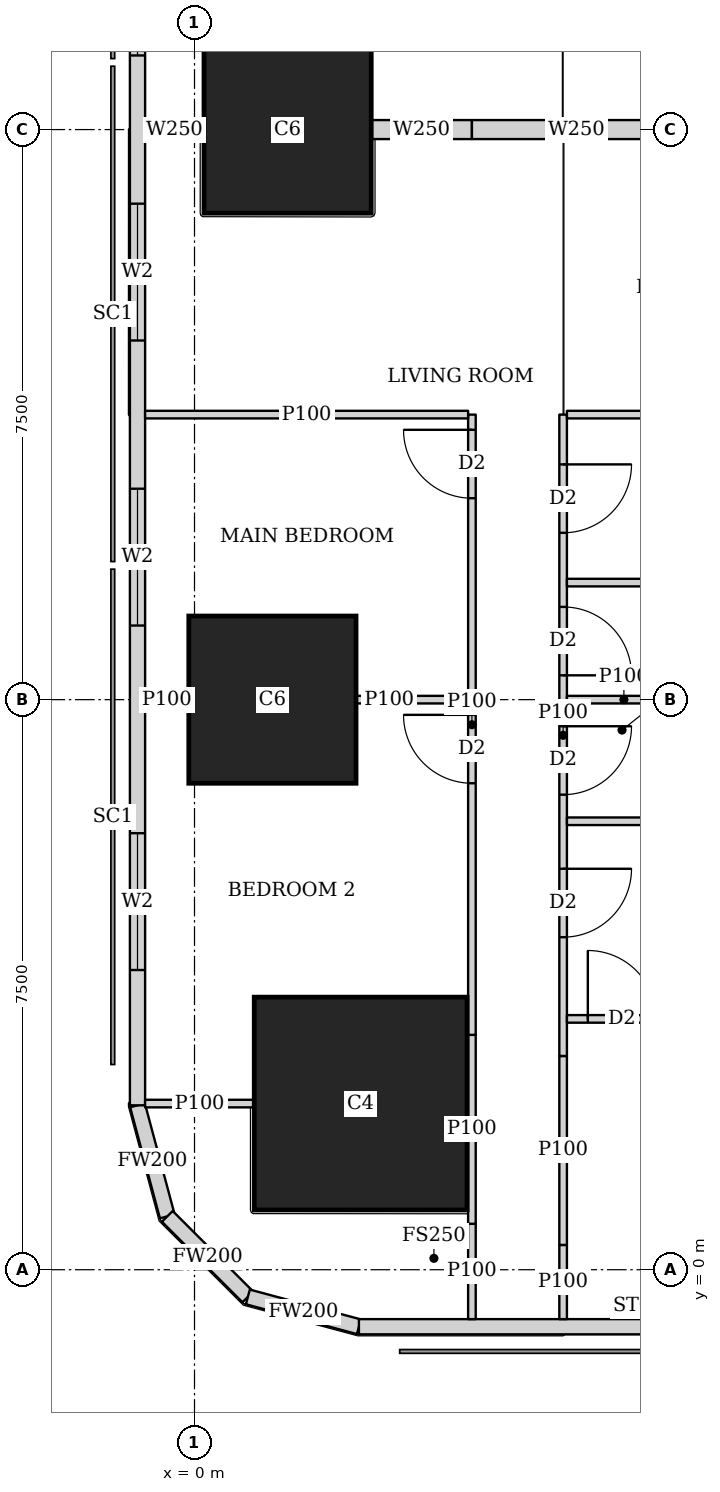
"""IFC4 building model, lengths in metres.
Left out: names, types, materials, properties, quantities, classifications, styles, units other than length and angle.
Written with IfcOpenShell. Run it as: python <this file> out.ifc"""

import sys

from ifc_helpers import new_model, si_unit, direction, frame, frame_2d, origin, origin_2d, place, context, subcontext, project, spatial, rectangle, extrude, element, fill, save


model = new_model("IFC4")
c1 = context("Model", 3, precision=1e-05, world=origin(), true_north=direction((0.0, 1.0)))
c2 = subcontext(c1, "Body", "Model", "MODEL_VIEW")
j1 = project(units=[si_unit("LENGTHUNIT", "METRE"), si_unit("PLANEANGLEUNIT", "RADIAN")], contexts=[c1])
p1 = place(None, origin())
s1 = spatial("IfcSite", under=j1, at=p1, CompositionType="ELEMENT")
p2 = place(p1, origin())
s2 = spatial("IfcBuilding", under=s1, at=p2, CompositionType="ELEMENT")
p3 = place(p2, frame((0.0, 0.0, 100.4)))
s3 = spatial("IfcBuildingStorey", under=s2, at=p3, CompositionType="ELEMENT", Elevation=100.4)
p4 = place(p3, frame((2.186, 2.186, 0.0), z_axis=(0.0, 0.0, 1.0), x_axis=(1.0, 0.0, 0.0)))
e1 = element("IfcColumn", 1, at=p4, inside=s3, PredefinedType="COLUMN", context=c2, shape_type="SweptSolid", body=[
    extrude(rectangle(XDim=2.8, YDim=2.8, at=origin_2d()), origin(), (0.0, 0.0, 1.0), 3.75),
])
for number, where, z_axis, x_axis in (
    (2, (1.025, 7.5, 0.0), (0.0, 0.0, 1.0), (1.0, 0.0, 0.0)),
    (3, (1.225, 15.0, 0.0), (0.0, 0.0, 1.0), (1.0, 0.0, 0.0)),
):
    element("IfcColumn", number, at=place(p3, frame(where, z_axis=z_axis, x_axis=x_axis)), inside=s3, PredefinedType="COLUMN", context=c2, shape_type="SweptSolid", body=[
        extrude(rectangle(XDim=2.2, YDim=2.2, at=origin_2d()), origin(), (0.0, 0.0, 1.0), 3.75),
    ])
p5 = place(p3, frame((2.163, -0.75, 0.0), z_axis=(0.0, 0.0, 1.0), x_axis=(1.0, 0.0, 0.0)))
e4 = element("IfcWall", 4, at=p5, inside=s3, PredefinedType="SOLIDWALL", context=c2, shape_type="SweptSolid", body=[
    extrude(rectangle(XDim=45.628, YDim=0.2, at=frame_2d((22.814, 0.0))), origin(), (0.0, 0.0, 1.0), 3.5),
])
p6 = place(p5, frame((9.537, 0.0, 0.9)))
e5 = element("IfcOpeningElement", 5, at=p6, cuts=e4, PredefinedType="OPENING", context=c2, shape_type="SweptSolid", body=[
    extrude(rectangle(XDim=1.8, YDim=1.5, at=frame_2d((0.9, 0.75))), frame((0.0, 0.11, 0.0), z_axis=(0.0, -1.0, 0.0), x_axis=(1.0, 0.0, 0.0)), (0.0, 0.0, 1.0), 0.22),
])
p7 = place(p5, frame((13.137, 0.0, 0.9)))
e6 = element("IfcOpeningElement", 6, at=p7, cuts=e4, PredefinedType="OPENING", context=c2, shape_type="SweptSolid", body=[
    extrude(rectangle(XDim=1.8, YDim=1.5, at=frame_2d((0.9, 0.75))), frame((0.0, 0.11, 0.0), z_axis=(0.0, -1.0, 0.0), x_axis=(1.0, 0.0, 0.0)), (0.0, 0.0, 1.0), 0.22),
])
p8 = place(p5, frame((16.737, 0.0, 0.9)))
e7 = element("IfcOpeningElement", 7, at=p8, cuts=e4, PredefinedType="OPENING", context=c2, shape_type="SweptSolid", body=[
    extrude(rectangle(XDim=1.8, YDim=1.5, at=frame_2d((0.9, 0.75))), frame((0.0, 0.11, 0.0), z_axis=(0.0, -1.0, 0.0), x_axis=(1.0, 0.0, 0.0)), (0.0, 0.0, 1.0), 0.22),
])
p9 = place(p5, frame((20.337, 0.0, 0.9)))
e8 = element("IfcOpeningElement", 8, at=p9, cuts=e4, PredefinedType="OPENING", context=c2, shape_type="SweptSolid", body=[
    extrude(rectangle(XDim=1.8, YDim=1.5, at=frame_2d((0.9, 0.75))), frame((0.0, 0.11, 0.0), z_axis=(0.0, -1.0, 0.0), x_axis=(1.0, 0.0, 0.0)), (0.0, 0.0, 1.0), 0.22),
])
p10 = place(p5, frame((23.937, 0.0, 0.9)))
e9 = element("IfcOpeningElement", 9, at=p10, cuts=e4, PredefinedType="OPENING", context=c2, shape_type="SweptSolid", body=[
    extrude(rectangle(XDim=1.8, YDim=1.5, at=frame_2d((0.9, 0.75))), frame((0.0, 0.11, 0.0), z_axis=(0.0, -1.0, 0.0), x_axis=(1.0, 0.0, 0.0)), (0.0, 0.0, 1.0), 0.22),
])
p11 = place(p5, frame((27.537, 0.0, 0.9)))
e10 = element("IfcOpeningElement", 10, at=p11, cuts=e4, PredefinedType="OPENING", context=c2, shape_type="SweptSolid", body=[
    extrude(rectangle(XDim=1.8, YDim=1.5, at=frame_2d((0.9, 0.75))), frame((0.0, 0.11, 0.0), z_axis=(0.0, -1.0, 0.0), x_axis=(1.0, 0.0, 0.0)), (0.0, 0.0, 1.0), 0.22),
])
p12 = place(p5, frame((31.137, 0.0, 0.9)))
e11 = element("IfcOpeningElement", 11, at=p12, cuts=e4, PredefinedType="OPENING", context=c2, shape_type="SweptSolid", body=[
    extrude(rectangle(XDim=1.8, YDim=1.5, at=frame_2d((0.9, 0.75))), frame((0.0, 0.11, 0.0), z_axis=(0.0, -1.0, 0.0), x_axis=(1.0, 0.0, 0.0)), (0.0, 0.0, 1.0), 0.22),
])
p13 = place(p5, frame((34.737, 0.0, 0.9)))
e12 = element("IfcOpeningElement", 12, at=p13, cuts=e4, PredefinedType="OPENING", context=c2, shape_type="SweptSolid", body=[
    extrude(rectangle(XDim=1.8, YDim=1.5, at=frame_2d((0.9, 0.75))), frame((0.0, 0.11, 0.0), z_axis=(0.0, -1.0, 0.0), x_axis=(1.0, 0.0, 0.0)), (0.0, 0.0, 1.0), 0.22),
])
p14 = place(p3, frame((-0.75, 42.837, 0.0), z_axis=(0.0, 0.0, 1.0), x_axis=(0.0, -1.0, 0.0)))
e13 = element("IfcWall", 13, at=p14, inside=s3, PredefinedType="SOLIDWALL", context=c2, shape_type="SweptSolid", body=[
    extrude(rectangle(XDim=40.674, YDim=0.2, at=frame_2d((20.337, 0.0))), origin(), (0.0, 0.0, 1.0), 3.5),
])
p15 = place(p14, frame((1.78, 0.0, 0.9)))
e14 = element("IfcOpeningElement", 14, at=p15, cuts=e13, PredefinedType="OPENING", context=c2, shape_type="SweptSolid", body=[
    extrude(rectangle(XDim=1.8, YDim=1.5, at=frame_2d((0.9, 0.75))), frame((0.0, 0.11, 0.0), z_axis=(0.0, -1.0, 0.0), x_axis=(1.0, 0.0, 0.0)), (0.0, 0.0, 1.0), 0.22),
])
p16 = place(p14, frame((6.312, 0.0, 0.9)))
e15 = element("IfcOpeningElement", 15, at=p16, cuts=e13, PredefinedType="OPENING", context=c2, shape_type="SweptSolid", body=[
    extrude(rectangle(XDim=1.8, YDim=1.5, at=frame_2d((0.9, 0.75))), frame((0.0, 0.11, 0.0), z_axis=(0.0, -1.0, 0.0), x_axis=(1.0, 0.0, 0.0)), (0.0, 0.0, 1.0), 0.22),
])
p17 = place(p14, frame((10.062, 0.0, 0.9)))
e16 = element("IfcOpeningElement", 16, at=p17, cuts=e13, PredefinedType="OPENING", context=c2, shape_type="SweptSolid", body=[
    extrude(rectangle(XDim=1.8, YDim=1.5, at=frame_2d((0.9, 0.75))), frame((0.0, 0.11, 0.0), z_axis=(0.0, -1.0, 0.0), x_axis=(1.0, 0.0, 0.0)), (0.0, 0.0, 1.0), 0.22),
])
p18 = place(p14, frame((13.812, 0.0, 0.9)))
e17 = element("IfcOpeningElement", 17, at=p18, cuts=e13, PredefinedType="OPENING", context=c2, shape_type="SweptSolid", body=[
    extrude(rectangle(XDim=1.8, YDim=1.5, at=frame_2d((0.9, 0.75))), frame((0.0, 0.11, 0.0), z_axis=(0.0, -1.0, 0.0), x_axis=(1.0, 0.0, 0.0)), (0.0, 0.0, 1.0), 0.22),
])
p19 = place(p14, frame((17.562, 0.0, 0.9)))
e18 = element("IfcOpeningElement", 18, at=p19, cuts=e13, PredefinedType="OPENING", context=c2, shape_type="SweptSolid", body=[
    extrude(rectangle(XDim=1.8, YDim=1.5, at=frame_2d((0.9, 0.75))), frame((0.0, 0.11, 0.0), z_axis=(0.0, -1.0, 0.0), x_axis=(1.0, 0.0, 0.0)), (0.0, 0.0, 1.0), 0.22),
])
p20 = place(p14, frame((21.312, 0.0, 0.9)))
e19 = element("IfcOpeningElement", 19, at=p20, cuts=e13, PredefinedType="OPENING", context=c2, shape_type="SweptSolid", body=[
    extrude(rectangle(XDim=1.8, YDim=1.5, at=frame_2d((0.9, 0.75))), frame((0.0, 0.11, 0.0), z_axis=(0.0, -1.0, 0.0), x_axis=(1.0, 0.0, 0.0)), (0.0, 0.0, 1.0), 0.22),
])
p21 = place(p14, frame((25.062, 0.0, 0.9)))
e20 = element("IfcOpeningElement", 20, at=p21, cuts=e13, PredefinedType="OPENING", context=c2, shape_type="SweptSolid", body=[
    extrude(rectangle(XDim=1.8, YDim=1.5, at=frame_2d((0.9, 0.75))), frame((0.0, 0.11, 0.0), z_axis=(0.0, -1.0, 0.0), x_axis=(1.0, 0.0, 0.0)), (0.0, 0.0, 1.0), 0.22),
])
p22 = place(p14, frame((28.812, 0.0, 0.9)))
e21 = element("IfcOpeningElement", 21, at=p22, cuts=e13, PredefinedType="OPENING", context=c2, shape_type="SweptSolid", body=[
    extrude(rectangle(XDim=1.8, YDim=1.5, at=frame_2d((0.9, 0.75))), frame((0.0, 0.11, 0.0), z_axis=(0.0, -1.0, 0.0), x_axis=(1.0, 0.0, 0.0)), (0.0, 0.0, 1.0), 0.22),
])
p23 = place(p14, frame((32.562, 0.0, 0.9)))
e22 = element("IfcOpeningElement", 22, at=p23, cuts=e13, PredefinedType="OPENING", context=c2, shape_type="SweptSolid", body=[
    extrude(rectangle(XDim=1.8, YDim=1.5, at=frame_2d((0.9, 0.75))), frame((0.0, 0.11, 0.0), z_axis=(0.0, -1.0, 0.0), x_axis=(1.0, 0.0, 0.0)), (0.0, 0.0, 1.0), 0.22),
])
p24 = place(p14, frame((37.094, 0.0, 0.9)))
e23 = element("IfcOpeningElement", 23, at=p24, cuts=e13, PredefinedType="OPENING", context=c2, shape_type="SweptSolid", body=[
    extrude(rectangle(XDim=1.8, YDim=1.5, at=frame_2d((0.9, 0.75))), frame((0.0, 0.11, 0.0), z_axis=(0.0, -1.0, 0.0), x_axis=(1.0, 0.0, 0.0)), (0.0, 0.0, 1.0), 0.22),
])
p25 = place(p3, frame((-0.75, 2.163, 0.0), z_axis=(0.0, 0.0, 1.0), x_axis=(0.259168954497, -0.965832000415, 0.0)))
e24 = element("IfcWall", 24, at=p25, inside=s3, PredefinedType="SOLIDWALL", context=c2, shape_type="SweptSolid", body=[
    extrude(rectangle(XDim=1.513, YDim=0.2, at=frame_2d((0.756, 0.0))), origin(), (0.0, 0.0, 1.0), 3.5),
])
p26 = place(p3, frame((-0.358, 0.702, 0.0), z_axis=(0.0, 0.0, 1.0), x_axis=(0.707106781187, -0.707106781187, 0.0)))
e25 = element("IfcWall", 25, at=p26, inside=s3, PredefinedType="SOLIDWALL", context=c2, shape_type="SweptSolid", body=[
    extrude(rectangle(XDim=1.499, YDim=0.2, at=frame_2d((0.75, 0.0))), origin(), (0.0, 0.0, 1.0), 3.5),
])
p27 = place(p3, frame((0.702, -0.358, 0.0), z_axis=(0.0, 0.0, 1.0), x_axis=(0.965832000415, -0.259168954497, 0.0)))
e26 = element("IfcWall", 26, at=p27, inside=s3, PredefinedType="SOLIDWALL", context=c2, shape_type="SweptSolid", body=[
    extrude(rectangle(XDim=1.513, YDim=0.2, at=frame_2d((0.756, 0.0))), origin(), (0.0, 0.0, 1.0), 3.5),
])
p28 = place(p3, frame((3.65, -0.65, 0.0), z_axis=(0.0, 0.0, 1.0), x_axis=(0.0, 1.0, 0.0)))
e27 = element("IfcWall", 27, at=p28, inside=s3, PredefinedType="PARTITIONING", context=c2, shape_type="SweptSolid", body=[
    extrude(rectangle(XDim=1.254, YDim=0.1, at=frame_2d((0.627, 0.0))), origin(), (0.0, 0.0, 1.0), 3.5),
])
p29 = place(p3, frame((3.65, 0.604, 0.0), z_axis=(0.0, 0.0, 1.0), x_axis=(0.0, 1.0, 0.0)))
e28 = element("IfcWall", 28, at=p29, inside=s3, PredefinedType="PARTITIONING", context=c2, shape_type="SweptSolid", body=[
    extrude(rectangle(XDim=2.486, YDim=0.1, at=frame_2d((1.243, 0.0))), origin(), (0.0, 0.0, 1.0), 2.05),
])
p30 = place(p3, frame((3.65, 3.09, 0.0), z_axis=(0.0, 0.0, 1.0), x_axis=(0.0, 1.0, 0.0)))
e29 = element("IfcWall", 29, at=p30, inside=s3, PredefinedType="PARTITIONING", context=c2, shape_type="SweptSolid", body=[
    extrude(rectangle(XDim=8.16, YDim=0.1, at=frame_2d((4.08, 0.0))), origin(), (0.0, 0.0, 1.0), 3.5),
])
p31 = place(p30, frame((7.06, 0.0, 0.0)))
e30 = element("IfcOpeningElement", 30, at=p31, cuts=e29, PredefinedType="OPENING", context=c2, shape_type="SweptSolid", body=[
    extrude(rectangle(XDim=0.9, YDim=2.1, at=frame_2d((0.45, 1.05))), frame((0.0, 0.06, 0.0), z_axis=(0.0, -1.0, 0.0), x_axis=(1.0, 0.0, 0.0)), (0.0, 0.0, 1.0), 0.12),
])
p32 = place(p30, frame((3.31, 0.0, 0.0)))
e31 = element("IfcOpeningElement", 31, at=p32, cuts=e29, PredefinedType="OPENING", context=c2, shape_type="SweptSolid", body=[
    extrude(rectangle(XDim=0.9, YDim=2.1, at=frame_2d((0.45, 1.05))), frame((0.0, 0.06, 0.0), z_axis=(0.0, -1.0, 0.0), x_axis=(1.0, 0.0, 0.0)), (0.0, 0.0, 1.0), 0.12),
])
p33 = place(p3, frame((4.85, -0.65, 0.0), z_axis=(0.0, 0.0, 1.0), x_axis=(0.0, 1.0, 0.0)))
e32 = element("IfcWall", 32, at=p33, inside=s3, PredefinedType="PARTITIONING", context=c2, shape_type="SweptSolid", body=[
    extrude(rectangle(XDim=0.976, YDim=0.1, at=frame_2d((0.488, 0.0))), origin(), (0.0, 0.0, 1.0), 3.5),
])
p34 = place(p3, frame((4.85, 0.326, 0.0), z_axis=(0.0, 0.0, 1.0), x_axis=(0.0, 1.0, 0.0)))
e33 = element("IfcWall", 33, at=p34, inside=s3, PredefinedType="PARTITIONING", context=c2, shape_type="SweptSolid", body=[
    extrude(rectangle(XDim=2.486, YDim=0.1, at=frame_2d((1.243, 0.0))), origin(), (0.0, 0.0, 1.0), 2.05),
])
p35 = place(p3, frame((4.85, 2.812, 0.0), z_axis=(0.0, 0.0, 1.0), x_axis=(0.0, 1.0, 0.0)))
e34 = element("IfcWall", 34, at=p35, inside=s3, PredefinedType="PARTITIONING", context=c2, shape_type="SweptSolid", body=[
    extrude(rectangle(XDim=8.438, YDim=0.1, at=frame_2d((4.219, 0.0))), origin(), (0.0, 0.0, 1.0), 3.5),
])
p36 = place(p35, frame((6.883, 0.0, 0.0)))
e35 = element("IfcOpeningElement", 35, at=p36, cuts=e34, PredefinedType="OPENING", context=c2, shape_type="SweptSolid", body=[
    extrude(rectangle(XDim=0.9, YDim=2.1, at=frame_2d((0.45, 1.05))), frame((0.0, 0.06, 0.0), z_axis=(0.0, -1.0, 0.0), x_axis=(1.0, 0.0, 0.0)), (0.0, 0.0, 1.0), 0.12),
])
p37 = place(p35, frame((3.438, 0.0, 0.0)))
e36 = element("IfcOpeningElement", 36, at=p37, cuts=e34, PredefinedType="OPENING", context=c2, shape_type="SweptSolid", body=[
    extrude(rectangle(XDim=0.9, YDim=2.1, at=frame_2d((0.45, 1.05))), frame((0.0, 0.06, 0.0), z_axis=(0.0, -1.0, 0.0), x_axis=(1.0, 0.0, 0.0)), (0.0, 0.0, 1.0), 0.12),
])
p38 = place(p35, frame((5.008, 0.0, 0.0)))
e37 = element("IfcOpeningElement", 37, at=p38, cuts=e34, PredefinedType="OPENING", context=c2, shape_type="SweptSolid", body=[
    extrude(rectangle(XDim=0.9, YDim=2.1, at=frame_2d((0.45, 1.05))), frame((0.0, 0.06, 0.0), z_axis=(0.0, -1.0, 0.0), x_axis=(1.0, 0.0, 0.0)), (0.0, 0.0, 1.0), 0.12),
])
p39 = place(p35, frame((1.563, 0.0, 0.0)))
e38 = element("IfcOpeningElement", 38, at=p39, cuts=e34, PredefinedType="OPENING", context=c2, shape_type="SweptSolid", body=[
    extrude(rectangle(XDim=0.9, YDim=2.1, at=frame_2d((0.45, 1.05))), frame((0.0, 0.06, 0.0), z_axis=(0.0, -1.0, 0.0), x_axis=(1.0, 0.0, 0.0)), (0.0, 0.0, 1.0), 0.12),
])
p40 = place(p3, frame((-0.65, 2.186, 0.0), z_axis=(0.0, 0.0, 1.0), x_axis=(1.0, 0.0, 0.0)))
e39 = element("IfcWall", 39, at=p40, inside=s3, PredefinedType="PARTITIONING", context=c2, shape_type="SweptSolid", body=[
    extrude(rectangle(XDim=1.435, YDim=0.1, at=frame_2d((0.717, 0.0))), origin(), (0.0, 0.0, 1.0), 3.5),
])
p41 = place(p3, frame((-0.65, 7.5, 0.0), z_axis=(0.0, 0.0, 1.0), x_axis=(1.0, 0.0, 0.0)))
e40 = element("IfcWall", 40, at=p41, inside=s3, PredefinedType="PARTITIONING", context=c2, shape_type="SweptSolid", body=[
    extrude(rectangle(XDim=0.574, YDim=0.1, at=frame_2d((0.287, 0.0))), origin(), (0.0, 0.0, 1.0), 2.05),
])
p42 = place(p3, frame((2.126, 7.5, 0.0), z_axis=(0.0, 0.0, 1.0), x_axis=(1.0, 0.0, 0.0)))
e41 = element("IfcWall", 41, at=p42, inside=s3, PredefinedType="PARTITIONING", context=c2, shape_type="SweptSolid", body=[
    extrude(rectangle(XDim=1.474, YDim=0.1, at=frame_2d((0.737, 0.0))), origin(), (0.0, 0.0, 1.0), 2.05),
])
p43 = place(p3, frame((-0.65, 11.25, 0.0), z_axis=(0.0, 0.0, 1.0), x_axis=(1.0, 0.0, 0.0)))
e42 = element("IfcWall", 42, at=p43, inside=s3, PredefinedType="PARTITIONING", context=c2, shape_type="SweptSolid", body=[
    extrude(rectangle(XDim=4.25, YDim=0.1, at=frame_2d((2.125, 0.0))), origin(), (0.0, 0.0, 1.0), 2.2),
])
p44 = place(p3, frame((4.9, 7.5, 0.0), z_axis=(0.0, 0.0, 1.0), x_axis=(1.0, 0.0, 0.0)))
e43 = element("IfcWall", 43, at=p44, inside=s3, PredefinedType="PARTITIONING", context=c2, shape_type="SweptSolid", body=[
    extrude(rectangle(XDim=1.499, YDim=0.1, at=frame_2d((0.75, 0.0))), origin(), (0.0, 0.0, 1.0), 3.5),
])
for number, where, z_axis, x_axis in (
    (44, (4.9, 11.25, 0.0), (0.0, 0.0, 1.0), (1.0, 0.0, 0.0)),
    (45, (4.9, 9.04, 0.0), (0.0, 0.0, 1.0), (1.0, 0.0, 0.0)),
    (46, (4.9, 5.9, 0.0), (0.0, 0.0, 1.0), (1.0, 0.0, 0.0)),
):
    element("IfcWall", number, at=place(p3, frame(where, z_axis=z_axis, x_axis=x_axis)), inside=s3, PredefinedType="PARTITIONING", context=c2, shape_type="SweptSolid", body=[
        extrude(rectangle(XDim=3.275, YDim=0.1, at=frame_2d((1.638, 0.0))), origin(), (0.0, 0.0, 1.0), 3.5),
    ])
p45 = place(p3, frame((-0.65, 15.0, 0.0), z_axis=(0.0, 0.0, 1.0), x_axis=(1.0, 0.0, 0.0)))
e47 = element("IfcWall", 47, at=p45, inside=s3, PredefinedType="SOLIDWALL", context=c2, shape_type="SweptSolid", body=[
    extrude(rectangle(XDim=0.774, YDim=0.25, at=frame_2d((0.387, 0.0))), origin(), (0.0, 0.0, 1.0), 3.5),
])
p46 = place(p3, frame((2.326, 15.0, 0.0), z_axis=(0.0, 0.0, 1.0), x_axis=(1.0, 0.0, 0.0)))
e48 = element("IfcWall", 48, at=p46, inside=s3, PredefinedType="SOLIDWALL", context=c2, shape_type="SweptSolid", body=[
    extrude(rectangle(XDim=1.324, YDim=0.25, at=frame_2d((0.662, 0.0))), origin(), (0.0, 0.0, 1.0), 3.5),
])
p47 = place(p3, frame((3.65, 15.0, 0.0), z_axis=(0.0, 0.0, 1.0), x_axis=(1.0, 0.0, 0.0)))
e49 = element("IfcWall", 49, at=p47, inside=s3, PredefinedType="SOLIDWALL", context=c2, shape_type="SweptSolid", body=[
    extrude(rectangle(XDim=2.749, YDim=0.25, at=frame_2d((1.375, 0.0))), origin(), (0.0, 0.0, 1.0), 3.5),
])
p48 = place(p3, frame((8.175, 3.3, 0.0), z_axis=(0.0, 0.0, 1.0), x_axis=(-1.0, 0.0, 0.0)))
e50 = element("IfcWall", 50, at=p48, inside=s3, PredefinedType="PARTITIONING", context=c2, shape_type="SweptSolid", body=[
    extrude(rectangle(XDim=3.275, YDim=0.1, at=frame_2d((1.638, 0.0))), origin(), (0.0, 0.0, 1.0), 3.5),
])
p49 = place(p48, frame((2.1, 0.0, 0.0)))
e51 = element("IfcOpeningElement", 51, at=p49, cuts=e50, PredefinedType="OPENING", context=c2, shape_type="SweptSolid", body=[
    extrude(rectangle(XDim=0.9, YDim=2.1, at=frame_2d((0.45, 1.05))), frame((0.0, 0.06, 0.0), z_axis=(0.0, -1.0, 0.0), x_axis=(1.0, 0.0, 0.0)), (0.0, 0.0, 1.0), 0.12),
])
p50 = place(p21, origin())
e52 = element("IfcWindow", 52, at=p50, inside=s3, PartitioningType="SINGLE_PANEL", PredefinedType="WINDOW", context=c2, shape_type="SweptSolid", body=[
    extrude(rectangle(XDim=1.8, YDim=1.5, at=frame_2d((0.9, 0.75))), frame((0.0, 0.03, 0.0), z_axis=(0.0, -1.0, 0.0), x_axis=(1.0, 0.0, 0.0)), (0.0, 0.0, 1.0), 0.06),
])
fill(e20, e52)
p51 = place(p22, origin())
e53 = element("IfcWindow", 53, at=p51, inside=s3, PartitioningType="SINGLE_PANEL", PredefinedType="WINDOW", context=c2, shape_type="SweptSolid", body=[
    extrude(rectangle(XDim=1.8, YDim=1.5, at=frame_2d((0.9, 0.75))), frame((0.0, 0.03, 0.0), z_axis=(0.0, -1.0, 0.0), x_axis=(1.0, 0.0, 0.0)), (0.0, 0.0, 1.0), 0.06),
])
fill(e21, e53)
p52 = place(p23, origin())
e54 = element("IfcWindow", 54, at=p52, inside=s3, PartitioningType="SINGLE_PANEL", PredefinedType="WINDOW", context=c2, shape_type="SweptSolid", body=[
    extrude(rectangle(XDim=1.8, YDim=1.5, at=frame_2d((0.9, 0.75))), frame((0.0, 0.03, 0.0), z_axis=(0.0, -1.0, 0.0), x_axis=(1.0, 0.0, 0.0)), (0.0, 0.0, 1.0), 0.06),
])
fill(e22, e54)
p53 = place(p24, origin())
e55 = element("IfcWindow", 55, at=p53, inside=s3, PartitioningType="SINGLE_PANEL", PredefinedType="WINDOW", context=c2, shape_type="SweptSolid", body=[
    extrude(rectangle(XDim=1.8, YDim=1.5, at=frame_2d((0.9, 0.75))), frame((0.0, 0.03, 0.0), z_axis=(0.0, -1.0, 0.0), x_axis=(1.0, 0.0, 0.0)), (0.0, 0.0, 1.0), 0.06),
])
fill(e23, e55)
p54 = place(p31, origin())
e56 = element("IfcDoor", 56, at=p54, inside=s3, OperationType="SINGLE_SWING_RIGHT", PredefinedType="DOOR", context=c2, shape_type="SweptSolid", body=[
    extrude(rectangle(XDim=0.9, YDim=2.1, at=frame_2d((0.45, 1.05))), frame((0.0, 0.025, 0.0), z_axis=(0.0, -1.0, 0.0), x_axis=(1.0, 0.0, 0.0)), (0.0, 0.0, 1.0), 0.05),
])
fill(e30, e56)
p55 = place(p32, origin())
e57 = element("IfcDoor", 57, at=p55, inside=s3, OperationType="SINGLE_SWING_RIGHT", PredefinedType="DOOR", context=c2, shape_type="SweptSolid", body=[
    extrude(rectangle(XDim=0.9, YDim=2.1, at=frame_2d((0.45, 1.05))), frame((0.0, 0.025, 0.0), z_axis=(0.0, -1.0, 0.0), x_axis=(1.0, 0.0, 0.0)), (0.0, 0.0, 1.0), 0.05),
])
fill(e31, e57)
p56 = place(p36, origin())
e58 = element("IfcDoor", 58, at=p56, inside=s3, OperationType="SINGLE_SWING_LEFT", PredefinedType="DOOR", context=c2, shape_type="SweptSolid", body=[
    extrude(rectangle(XDim=0.9, YDim=2.1, at=frame_2d((0.45, 1.05))), frame((0.0, 0.025, 0.0), z_axis=(0.0, -1.0, 0.0), x_axis=(1.0, 0.0, 0.0)), (0.0, 0.0, 1.0), 0.05),
])
fill(e35, e58)
p57 = place(p37, origin())
e59 = element("IfcDoor", 59, at=p57, inside=s3, OperationType="SINGLE_SWING_LEFT", PredefinedType="DOOR", context=c2, shape_type="SweptSolid", body=[
    extrude(rectangle(XDim=0.9, YDim=2.1, at=frame_2d((0.45, 1.05))), frame((0.0, 0.025, 0.0), z_axis=(0.0, -1.0, 0.0), x_axis=(1.0, 0.0, 0.0)), (0.0, 0.0, 1.0), 0.05),
])
fill(e36, e59)
p58 = place(p38, origin())
e60 = element("IfcDoor", 60, at=p58, inside=s3, OperationType="SINGLE_SWING_RIGHT", PredefinedType="DOOR", context=c2, shape_type="SweptSolid", body=[
    extrude(rectangle(XDim=0.9, YDim=2.1, at=frame_2d((0.45, 1.05))), frame((0.0, 0.025, 0.0), z_axis=(0.0, -1.0, 0.0), x_axis=(1.0, 0.0, 0.0)), (0.0, 0.0, 1.0), 0.05),
])
fill(e37, e60)
p59 = place(p39, origin())
e61 = element("IfcDoor", 61, at=p59, inside=s3, OperationType="SINGLE_SWING_LEFT", PredefinedType="DOOR", context=c2, shape_type="SweptSolid", body=[
    extrude(rectangle(XDim=0.9, YDim=2.1, at=frame_2d((0.45, 1.05))), frame((0.0, 0.025, 0.0), z_axis=(0.0, -1.0, 0.0), x_axis=(1.0, 0.0, 0.0)), (0.0, 0.0, 1.0), 0.05),
])
fill(e38, e61)
p60 = place(p49, origin())
e62 = element("IfcDoor", 62, at=p60, inside=s3, OperationType="SINGLE_SWING_LEFT", PredefinedType="DOOR", context=c2, shape_type="SweptSolid", body=[
    extrude(rectangle(XDim=0.9, YDim=2.1, at=frame_2d((0.45, 1.05))), frame((0.0, 0.025, 0.0), z_axis=(0.0, -1.0, 0.0), x_axis=(1.0, 0.0, 0.0)), (0.0, 0.0, 1.0), 0.05),
])
fill(e51, e62)
save(model, sys.argv[1])
